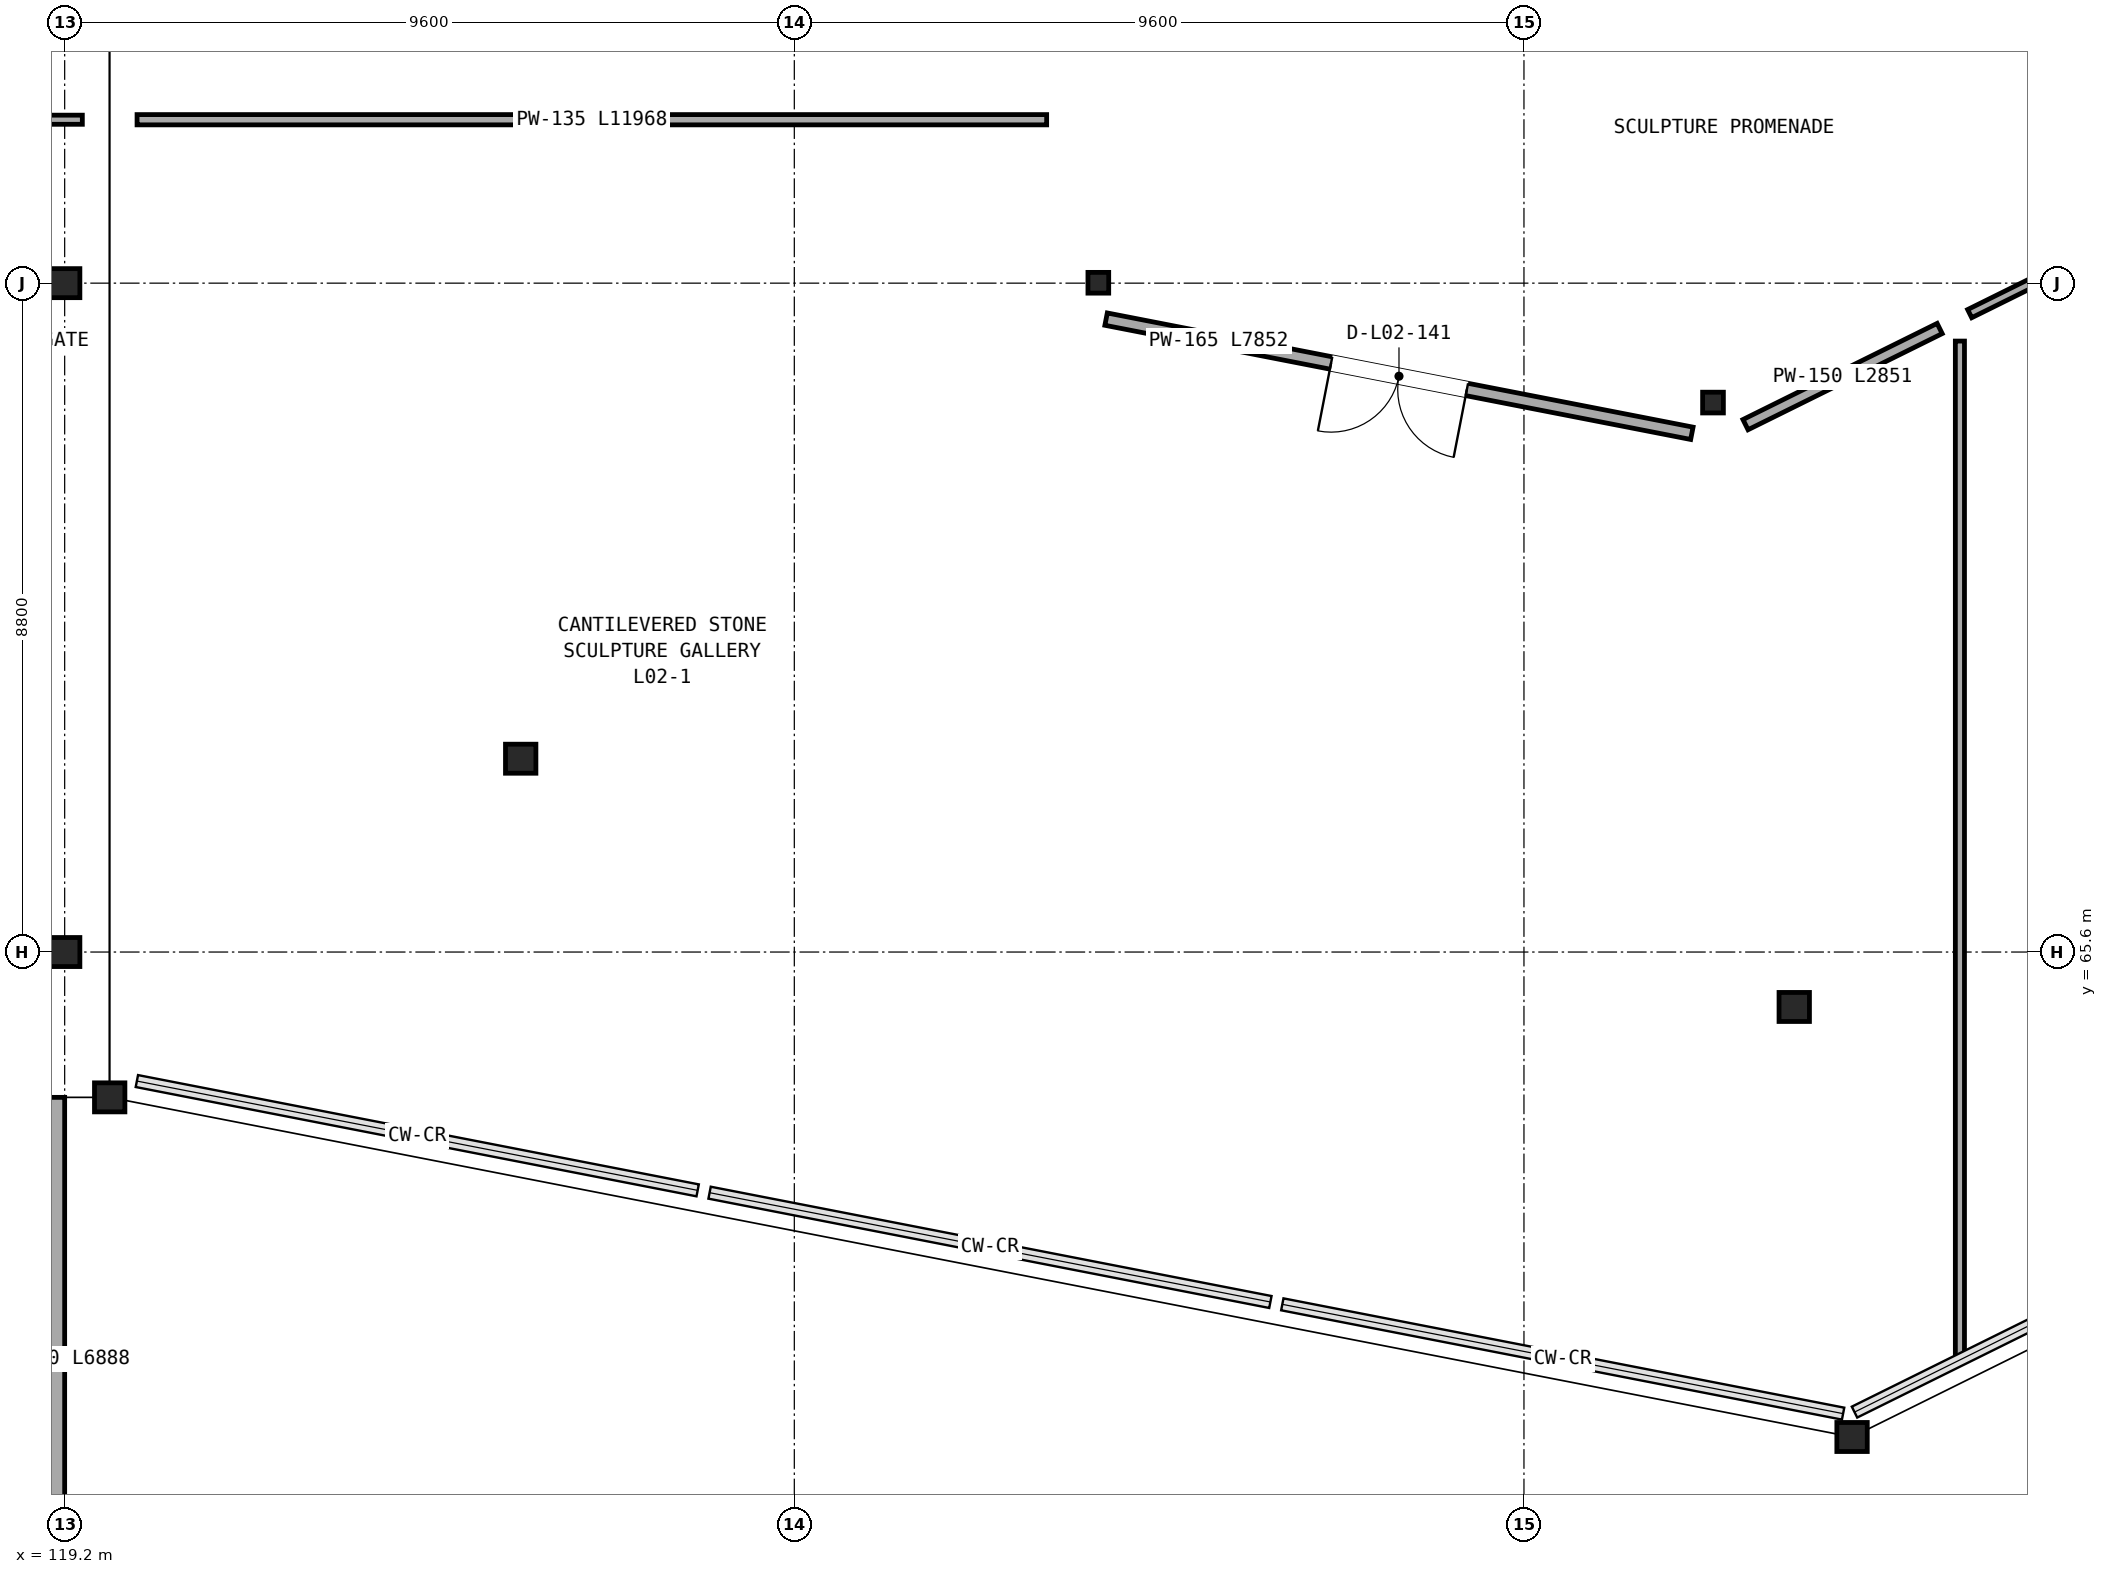
"""IFC4 building model, lengths in metres.
Left out: names, types, materials, properties, quantities, classifications, styles, units other than length and angle.
Written with IfcOpenShell. Run it as: python <this file> out.ifc"""

import sys

from ifc_helpers import new_model, si_unit, direction, frame, frame_2d, origin, origin_2d, place, context, subcontext, project, spatial, rectangle, hollow_circle, i_section, extrude, element, fill, save


model = new_model("IFC4")
c1 = context("Model", 3, precision=1e-05, world=origin(), true_north=direction((0.0, 1.0)))
c2 = subcontext(c1, "Body", "Model", "MODEL_VIEW")
j1 = project(units=[si_unit("LENGTHUNIT", "METRE"), si_unit("PLANEANGLEUNIT", "RADIAN")], contexts=[c1])
p1 = place(None, origin())
s1 = spatial("IfcSite", under=j1, at=p1, CompositionType="ELEMENT")
p2 = place(p1, origin())
s2 = spatial("IfcBuilding", under=s1, at=p2, CompositionType="ELEMENT")
p3 = place(p2, frame((0.0, 0.0, 10.1)))
s3 = spatial("IfcBuildingStorey", under=s2, at=p3, CompositionType="ELEMENT", Elevation=10.1)
for number, where, z_axis, x_axis in (
    (1, (119.2, 65.6, 0.0), (0.0, 0.0, 1.0), (1.0, 0.0, 0.0)),
    (2, (119.2, 74.4, 0.0), (0.0, 0.0, 1.0), (1.0, 0.0, 0.0)),
):
    element("IfcColumn", number, at=place(p3, frame(where, z_axis=z_axis, x_axis=x_axis)), inside=s3, PredefinedType="COLUMN", context=c2, shape_type="SweptSolid", body=[
        extrude(i_section(OverallWidth=0.4, OverallDepth=0.382, WebThickness=0.025, FlangeThickness=0.036, at=origin_2d()), origin(), (0.0, 0.0, 1.0), 4.5),
    ])
p4 = place(p3, frame((119.792, 63.688, 0.0), z_axis=(0.12979742642, 0.106961208422, 0.985754496813), x_axis=(-0.635952423064, 0.771728265388, 0.0)))
e3 = element("IfcColumn", 3, at=p4, inside=s3, PredefinedType="COLUMN", context=c2, shape_type="SweptSolid", body=[
    extrude(i_section(OverallWidth=0.4, OverallDepth=0.382, WebThickness=0.025, FlangeThickness=0.036, at=origin_2d()), origin(), (0.0, 0.0, 1.0), 4.565),
])
p5 = place(p3, frame((125.2, 68.143, 0.0), z_axis=(0.0, 0.0, 1.0), x_axis=(1.0, 0.0, 0.0)))
e4 = element("IfcColumn", 4, at=p5, inside=s3, PredefinedType="COLUMN", context=c2, shape_type="SweptSolid", body=[
    extrude(i_section(OverallWidth=0.4, OverallDepth=0.382, WebThickness=0.025, FlangeThickness=0.036, at=origin_2d()), origin(), (0.0, 0.0, 1.0), 4.5),
])
p6 = place(p3, frame((132.8, 74.405, 0.0), z_axis=(0.0, 0.0, 1.0), x_axis=(1.0, 0.0, 0.0)))
e5 = element("IfcColumn", 5, at=p6, inside=s3, PredefinedType="COLUMN", context=c2, shape_type="SweptSolid", body=[
    extrude(hollow_circle(Radius=0.136, WallThickness=0.009, at=origin_2d()), origin(), (0.0, 0.0, 1.0), 4.5),
])
p7 = place(p3, frame((142.717, 59.22, 0.0), z_axis=(-0.018378012299, 0.136437933415, 0.990478136553), x_axis=(-0.991049740954, -0.133493112015, 0.0)))
e6 = element("IfcColumn", 6, at=p7, inside=s3, PredefinedType="COLUMN", context=c2, shape_type="SweptSolid", body=[
    extrude(i_section(OverallWidth=0.4, OverallDepth=0.382, WebThickness=0.025, FlangeThickness=0.036, at=origin_2d()), origin(), (0.0, 0.0, 1.0), 4.543),
])
p8 = place(p3, frame((141.956, 64.877, 0.0), z_axis=(0.0, 0.0, 1.0), x_axis=(1.0, 0.0, 0.0)))
e7 = element("IfcColumn", 7, at=p8, inside=s3, PredefinedType="COLUMN", context=c2, shape_type="SweptSolid", body=[
    extrude(i_section(OverallWidth=0.4, OverallDepth=0.382, WebThickness=0.025, FlangeThickness=0.036, at=origin_2d()), origin(), (0.0, 0.0, 1.0), 4.5),
])
p9 = place(p3, frame((140.887, 72.829, 0.0), z_axis=(0.0, 0.0, 1.0), x_axis=(1.0, 0.0, 0.0)))
e8 = element("IfcColumn", 8, at=p9, inside=s3, PredefinedType="COLUMN", context=c2, shape_type="SweptSolid", body=[
    extrude(hollow_circle(Radius=0.136, WallThickness=0.009, at=origin_2d()), origin(), (0.0, 0.0, 1.0), 4.5),
])
p10 = place(p3, frame((118.99, 56.8, 0.0), z_axis=(0.0, 0.0, 1.0), x_axis=(0.0, 1.0, 0.0)))
e9 = element("IfcWall", 9, at=p10, inside=s3, PredefinedType="SOLIDWALL", context=c2, shape_type="SweptSolid", body=[
    extrude(rectangle(XDim=6.888, YDim=0.42, at=frame_2d((3.444, 0.0))), origin(), (0.0, 0.0, 1.0), 3.628),
])
p11 = place(p3, frame((132.902, 73.927, 0.0), z_axis=(0.0, 0.0, 1.0), x_axis=(0.98152920164, -0.191312378918, 0.0)))
e10 = element("IfcWall", 10, at=p11, inside=s3, PredefinedType="PARTITIONING", context=c2, shape_type="SweptSolid", body=[
    extrude(rectangle(XDim=7.852, YDim=0.165, at=frame_2d((3.926, 0.0))), origin(), (0.0, 0.0, 1.0), 4.13),
])
p12 = place(p11, frame((3.016, 0.0, 0.0)))
e11 = element("IfcOpeningElement", 11, at=p12, cuts=e10, PredefinedType="OPENING", context=c2, shape_type="SweptSolid", body=[
    extrude(rectangle(XDim=1.82, YDim=2.34, at=frame_2d((0.91, 1.17))), frame((0.0, 0.093, 0.0), z_axis=(0.0, -1.0, 0.0), x_axis=(1.0, 0.0, 0.0)), (0.0, 0.0, 1.0), 0.185),
])
p13 = place(p3, frame((141.315, 72.538, 0.0), z_axis=(0.0, 0.0, 1.0), x_axis=(0.896167481074, 0.443715951782, 0.0)))
e12 = element("IfcWall", 12, at=p13, inside=s3, PredefinedType="PARTITIONING", context=c2, shape_type="SweptSolid", body=[
    extrude(rectangle(XDim=2.851, YDim=0.15, at=frame_2d((1.425, 0.0))), origin(), (0.0, 0.0, 1.0), 4.13),
])
p14 = place(p3, frame((120.152, 76.55, 0.0), z_axis=(0.0, 0.0, 1.0), x_axis=(1.0, 0.0, 0.0)))
e13 = element("IfcWall", 13, at=p14, inside=s3, PredefinedType="PARTITIONING", context=c2, shape_type="SweptSolid", body=[
    extrude(rectangle(XDim=11.968, YDim=0.135, at=frame_2d((5.984, 0.0))), origin(), (0.0, 0.0, 1.0), 3.51),
])
p15 = place(p3, frame((144.264, 73.999, 0.0), z_axis=(0.0, 0.0, 1.0), x_axis=(0.896169857626, 0.443711151857, 0.0)))
e14 = element("IfcWall", 14, at=p15, inside=s3, PredefinedType="PARTITIONING", context=c2, shape_type="SweptSolid", body=[
    extrude(rectangle(XDim=8.596, YDim=0.12, at=frame_2d((4.298, 0.0))), origin(), (0.0, 0.0, 1.0), 4.13),
])
p16 = place(p3, frame((110.05, 76.55, 0.0), z_axis=(0.0, 0.0, 1.0), x_axis=(1.0, 0.0, 0.0)))
e15 = element("IfcWall", 15, at=p16, inside=s3, PredefinedType="PARTITIONING", context=c2, shape_type="SweptSolid", body=[
    extrude(rectangle(XDim=9.382, YDim=0.12, at=frame_2d((4.691, 0.0))), origin(), (0.0, 0.0, 1.0), 3.763),
])
p17 = place(p3, frame((144.136, 73.638, 0.0), z_axis=(0.0, 0.0, 1.0), x_axis=(0.0, -1.0, 0.0)))
e16 = element("IfcWall", 16, at=p17, inside=s3, PredefinedType="PARTITIONING", context=c2, shape_type="SweptSolid", body=[
    extrude(rectangle(XDim=13.382, YDim=0.12, at=frame_2d((6.691, 0.0))), origin(), (0.0, 0.0, 1.0), 2.75),
])
p18 = place(p12, frame((1.82, 0.0, 0.0), z_axis=(0.0, 0.0, 1.0), x_axis=(-1.0, 0.0, 0.0)))
e17 = element("IfcDoor", 17, at=p18, inside=s3, OperationType="DOUBLE_DOOR_SINGLE_SWING", PredefinedType="DOOR", context=c2, shape_type="SweptSolid", body=[
    extrude(rectangle(XDim=1.82, YDim=2.34, at=frame_2d((0.91, 1.17))), frame((0.0, 0.025, 0.0), z_axis=(0.0, -1.0, 0.0), x_axis=(1.0, 0.0, 0.0)), (0.0, 0.0, 1.0), 0.05),
])
fill(e11, e17)
save(model, sys.argv[1])
